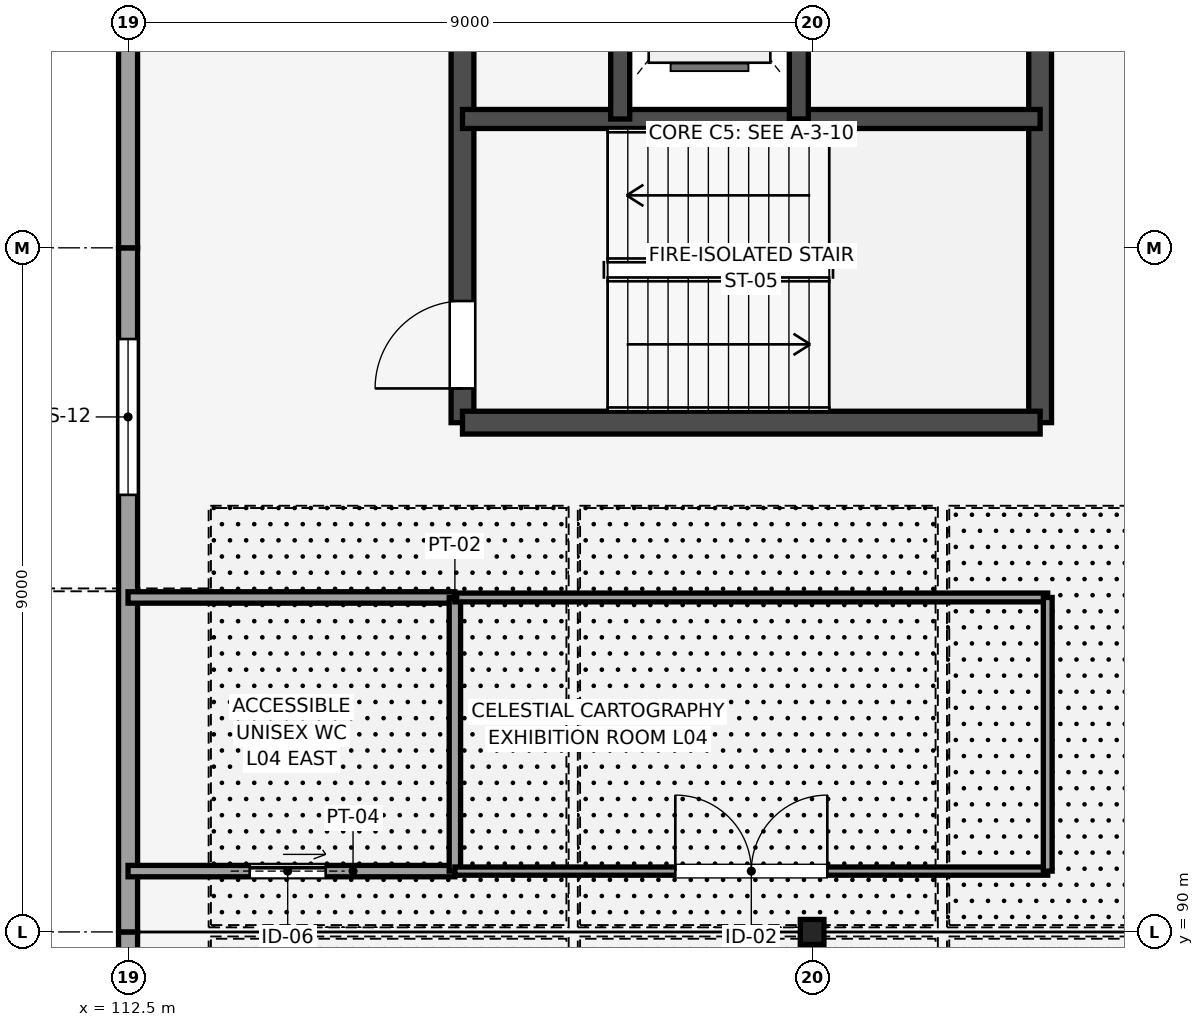
"""IFC4 building model, lengths in metres.
Left out: names, types, materials, properties, quantities, classifications, styles, units other than length and angle.
Written with IfcOpenShell. Run it as: python <this file> out.ifc"""

import sys

from ifc_helpers import new_model, si_unit, direction, frame, frame_2d, origin, origin_2d, place, context, subcontext, project, spatial, rectangle, i_section, extrude, element, fill, save


model = new_model("IFC4")
c1 = context("Model", 3, precision=1e-05, world=origin(), true_north=direction((0.0, 1.0)))
c2 = subcontext(c1, "Body", "Model", "MODEL_VIEW")
j1 = project(units=[si_unit("LENGTHUNIT", "METRE"), si_unit("PLANEANGLEUNIT", "RADIAN")], contexts=[c1])
p1 = place(None, origin())
s1 = spatial("IfcSite", under=j1, at=p1, CompositionType="ELEMENT")
p2 = place(p1, origin())
s2 = spatial("IfcBuilding", under=s1, at=p2, CompositionType="ELEMENT")
p3 = place(p2, frame((0.0, 0.0, 18.9)))
s3 = spatial("IfcBuildingStorey", under=s2, at=p3, CompositionType="ELEMENT", Elevation=18.9)
p4 = place(p3, frame((121.5, 90.0, 0.0), z_axis=(0.0, 0.0, 1.0), x_axis=(1.0, 0.0, 0.0)))
e1 = element("IfcColumn", 1, at=p4, inside=s3, PredefinedType="COLUMN", context=c2, shape_type="SweptSolid", body=[
    extrude(i_section(OverallWidth=0.311, OverallDepth=0.327, WebThickness=0.016, FlangeThickness=0.025, FilletRadius=0.017, at=origin_2d()), origin(), (0.0, 0.0, 1.0), 4.5),
])
p5 = place(p3, frame((116.9, 96.7, 0.0), z_axis=(0.0, 0.0, 1.0), x_axis=(0.0, 1.0, 0.0)))
e2 = element("IfcWall", 2, at=p5, inside=s3, PredefinedType="SHEAR", context=c2, shape_type="SweptSolid", body=[
    extrude(rectangle(XDim=7.6, YDim=0.3, at=frame_2d((3.8, 0.0))), origin(), (0.0, 0.0, 1.0), 4.5),
])
p6 = place(p5, frame((0.45, 0.0, 0.0)))
e3 = element("IfcOpeningElement", 3, at=p6, cuts=e2, PredefinedType="OPENING", context=c2, shape_type="SweptSolid", body=[
    extrude(rectangle(XDim=1.15, YDim=2.15, at=frame_2d((0.575, 1.075))), frame((0.0, 0.16, 0.0), z_axis=(0.0, -1.0, 0.0), x_axis=(1.0, 0.0, 0.0)), (0.0, 0.0, 1.0), 0.32),
])
for number, where, z_axis, x_axis in (
    (4, (124.5, 96.7, 0.0), (0.0, 0.0, 1.0), (0.0, 1.0, 0.0)),
    (5, (116.9, 96.7, 0.0), (0.0, 0.0, 1.0), (1.0, 0.0, 0.0)),
):
    element("IfcWall", number, at=place(p3, frame(where, z_axis=z_axis, x_axis=x_axis)), inside=s3, PredefinedType="SHEAR", context=c2, shape_type="SweptSolid", body=[
        extrude(rectangle(XDim=7.6, YDim=0.3, at=frame_2d((3.8, 0.0))), origin(), (0.0, 0.0, 1.0), 4.5),
    ])
p7 = place(p3, frame((116.9, 100.695, 0.0), z_axis=(0.0, 0.0, 1.0), x_axis=(1.0, 0.0, 0.0)))
e6 = element("IfcWall", 6, at=p7, inside=s3, PredefinedType="SHEAR", context=c2, shape_type="SweptSolid", body=[
    extrude(rectangle(XDim=7.6, YDim=0.25, at=frame_2d((3.8, 0.0))), origin(), (0.0, 0.0, 1.0), 4.5),
])
for number, where, z_axis, x_axis in (
    (7, (118.975, 100.695, 0.0), (0.0, 0.0, 1.0), (0.0, 1.0, 0.0)),
    (8, (121.325, 100.695, 0.0), (0.0, 0.0, 1.0), (0.0, 1.0, 0.0)),
):
    element("IfcWall", number, at=place(p3, frame(where, z_axis=z_axis, x_axis=x_axis)), inside=s3, PredefinedType="SHEAR", context=c2, shape_type="SweptSolid", body=[
        extrude(rectangle(XDim=3.605, YDim=0.25, at=frame_2d((1.802, 0.0))), origin(), (0.0, 0.0, 1.0), 4.5),
    ])
p8 = place(p3, frame((112.5, 90.0, 0.0), z_axis=(0.0, 0.0, 1.0), x_axis=(0.0, -1.0, 0.0)))
e9 = element("IfcWall", 9, at=p8, inside=s3, PredefinedType="STANDARD", context=c2, shape_type="SweptSolid", body=[
    extrude(rectangle(XDim=9.0, YDim=0.25, at=frame_2d((4.5, 0.0))), origin(), (0.0, 0.0, 1.0), 4.32),
])
p9 = place(p8, frame((5.2, 0.0, 1.0)))
e10 = element("IfcOpeningElement", 10, at=p9, cuts=e9, PredefinedType="OPENING", context=c2, shape_type="SweptSolid", body=[
    extrude(rectangle(XDim=1.95, YDim=1.65, at=frame_2d((0.975, 0.825))), frame((0.0, 0.135, 0.0), z_axis=(0.0, -1.0, 0.0), x_axis=(1.0, 0.0, 0.0)), (0.0, 0.0, 1.0), 0.27),
])
p10 = place(p3, frame((112.5, 99.0, 0.0), z_axis=(0.0, 0.0, 1.0), x_axis=(0.0, -1.0, 0.0)))
e11 = element("IfcWall", 11, at=p10, inside=s3, PredefinedType="STANDARD", context=c2, shape_type="SweptSolid", body=[
    extrude(rectangle(XDim=9.0, YDim=0.25, at=frame_2d((4.5, 0.0))), origin(), (0.0, 0.0, 1.0), 4.32),
])
p11 = place(p10, frame((1.2, 0.0, 1.0)))
e12 = element("IfcOpeningElement", 12, at=p11, cuts=e11, PredefinedType="OPENING", context=c2, shape_type="SweptSolid", body=[
    extrude(rectangle(XDim=2.05, YDim=1.65, at=frame_2d((1.025, 0.825))), frame((0.0, 0.135, 0.0), z_axis=(0.0, -1.0, 0.0), x_axis=(1.0, 0.0, 0.0)), (0.0, 0.0, 1.0), 0.27),
])
p12 = place(p3, frame((112.5, 108.0, 0.0), z_axis=(0.0, 0.0, 1.0), x_axis=(0.0, -1.0, 0.0)))
e13 = element("IfcWall", 13, at=p12, inside=s3, PredefinedType="STANDARD", context=c2, shape_type="SweptSolid", body=[
    extrude(rectangle(XDim=9.0, YDim=0.25, at=frame_2d((4.5, 0.0))), origin(), (0.0, 0.0, 1.0), 4.32),
])
p13 = place(p12, frame((3.4, 0.0, 1.0)))
e14 = element("IfcOpeningElement", 14, at=p13, cuts=e13, PredefinedType="OPENING", context=c2, shape_type="SweptSolid", body=[
    extrude(rectangle(XDim=2.15, YDim=1.65, at=frame_2d((1.075, 0.825))), frame((0.0, 0.135, 0.0), z_axis=(0.0, -1.0, 0.0), x_axis=(1.0, 0.0, 0.0)), (0.0, 0.0, 1.0), 0.27),
])
p14 = place(p3, frame((112.5, 90.8, 0.0), z_axis=(0.0, 0.0, 1.0), x_axis=(1.0, 0.0, 0.0)))
e15 = element("IfcWall", 15, at=p14, inside=s3, PredefinedType="PARTITIONING", context=c2, shape_type="SweptSolid", body=[
    extrude(rectangle(XDim=4.3, YDim=0.15, at=frame_2d((2.15, 0.0))), origin(), (0.0, 0.0, 1.0), 4.32),
])
p15 = place(p14, frame((1.6, 0.0, 0.0)))
e16 = element("IfcOpeningElement", 16, at=p15, cuts=e15, PredefinedType="OPENING", context=c2, shape_type="SweptSolid", body=[
    extrude(rectangle(XDim=1.0, YDim=2.15, at=frame_2d((0.5, 1.075))), frame((0.0, 0.085, 0.0), z_axis=(0.0, -1.0, 0.0), x_axis=(1.0, 0.0, 0.0)), (0.0, 0.0, 1.0), 0.17),
])
p16 = place(p3, frame((112.5, 94.4, 0.0), z_axis=(0.0, 0.0, 1.0), x_axis=(1.0, 0.0, 0.0)))
e17 = element("IfcWall", 17, at=p16, inside=s3, PredefinedType="PARTITIONING", context=c2, shape_type="SweptSolid", body=[
    extrude(rectangle(XDim=4.3, YDim=0.15, at=frame_2d((2.15, 0.0))), origin(), (0.0, 0.0, 1.0), 4.32),
])
p17 = place(p3, frame((116.8, 90.8, 0.0), z_axis=(0.0, 0.0, 1.0), x_axis=(0.0, 1.0, 0.0)))
e18 = element("IfcWall", 18, at=p17, inside=s3, PredefinedType="PARTITIONING", context=c2, shape_type="SweptSolid", body=[
    extrude(rectangle(XDim=3.6, YDim=0.15, at=frame_2d((1.8, 0.0))), origin(), (0.0, 0.0, 1.0), 4.32),
])
p18 = place(p3, frame((116.8, 90.8, 0.0), z_axis=(0.0, 0.0, 1.0), x_axis=(1.0, 0.0, 0.0)))
e19 = element("IfcWall", 19, at=p18, inside=s3, PredefinedType="PARTITIONING", context=c2, shape_type="SweptSolid", body=[
    extrude(rectangle(XDim=7.8, YDim=0.108, at=frame_2d((3.9, 0.0))), origin(), (0.0, 0.0, 1.0), 4.32),
])
p19 = place(p18, frame((2.9, 0.0, 0.0)))
e20 = element("IfcOpeningElement", 20, at=p19, cuts=e19, PredefinedType="OPENING", context=c2, shape_type="SweptSolid", body=[
    extrude(rectangle(XDim=2.0, YDim=2.4, at=frame_2d((1.0, 1.2))), frame((0.0, 0.064, 0.0), z_axis=(0.0, -1.0, 0.0), x_axis=(1.0, 0.0, 0.0)), (0.0, 0.0, 1.0), 0.128),
])
p20 = place(p3, frame((116.8, 94.4, 0.0), z_axis=(0.0, 0.0, 1.0), x_axis=(1.0, 0.0, 0.0)))
e21 = element("IfcWall", 21, at=p20, inside=s3, PredefinedType="PARTITIONING", context=c2, shape_type="SweptSolid", body=[
    extrude(rectangle(XDim=7.8, YDim=0.116, at=frame_2d((3.9, 0.0))), origin(), (0.0, 0.0, 1.0), 4.32),
])
p21 = place(p3, frame((124.6, 90.8, 0.0), z_axis=(0.0, 0.0, 1.0), x_axis=(0.0, 1.0, 0.0)))
e22 = element("IfcWall", 22, at=p21, inside=s3, PredefinedType="PARTITIONING", context=c2, shape_type="SweptSolid", body=[
    extrude(rectangle(XDim=3.6, YDim=0.116, at=frame_2d((1.8, 0.0))), origin(), (0.0, 0.0, 1.0), 4.32),
])
p22 = place(p11, origin())
e23 = element("IfcWindow", 23, at=p22, inside=s3, PartitioningType="SINGLE_PANEL", PredefinedType="WINDOW", context=c2, shape_type="SweptSolid", body=[
    extrude(rectangle(XDim=2.05, YDim=1.65, at=frame_2d((1.025, 0.825))), frame((0.0, 0.03, 0.0), z_axis=(0.0, -1.0, 0.0), x_axis=(1.0, 0.0, 0.0)), (0.0, 0.0, 1.0), 0.06),
])
fill(e12, e23)
p23 = place(p6, origin())
e24 = element("IfcDoor", 24, at=p23, inside=s3, OperationType="SINGLE_SWING_LEFT", PredefinedType="DOOR", context=c2, shape_type="SweptSolid", body=[
    extrude(rectangle(XDim=1.15, YDim=2.15, at=frame_2d((0.575, 1.075))), frame((0.0, 0.025, 0.0), z_axis=(0.0, -1.0, 0.0), x_axis=(1.0, 0.0, 0.0)), (0.0, 0.0, 1.0), 0.05),
])
fill(e3, e24)
p24 = place(p15, origin())
e25 = element("IfcDoor", 25, at=p24, inside=s3, OperationType="SLIDING_TO_LEFT", PredefinedType="DOOR", context=c2, shape_type="SweptSolid", body=[
    extrude(rectangle(XDim=1.0, YDim=2.15, at=frame_2d((0.5, 1.075))), frame((0.0, 0.025, 0.0), z_axis=(0.0, -1.0, 0.0), x_axis=(1.0, 0.0, 0.0)), (0.0, 0.0, 1.0), 0.05),
])
fill(e16, e25)
p25 = place(p19, origin())
e26 = element("IfcDoor", 26, at=p25, inside=s3, OperationType="DOUBLE_DOOR_DOUBLE_SWING", PredefinedType="DOOR", context=c2, shape_type="SweptSolid", body=[
    extrude(rectangle(XDim=2.0, YDim=2.4, at=frame_2d((1.0, 1.2))), frame((0.0, 0.025, 0.0), z_axis=(0.0, -1.0, 0.0), x_axis=(1.0, 0.0, 0.0)), (0.0, 0.0, 1.0), 0.05),
])
fill(e20, e26)
save(model, sys.argv[1])
